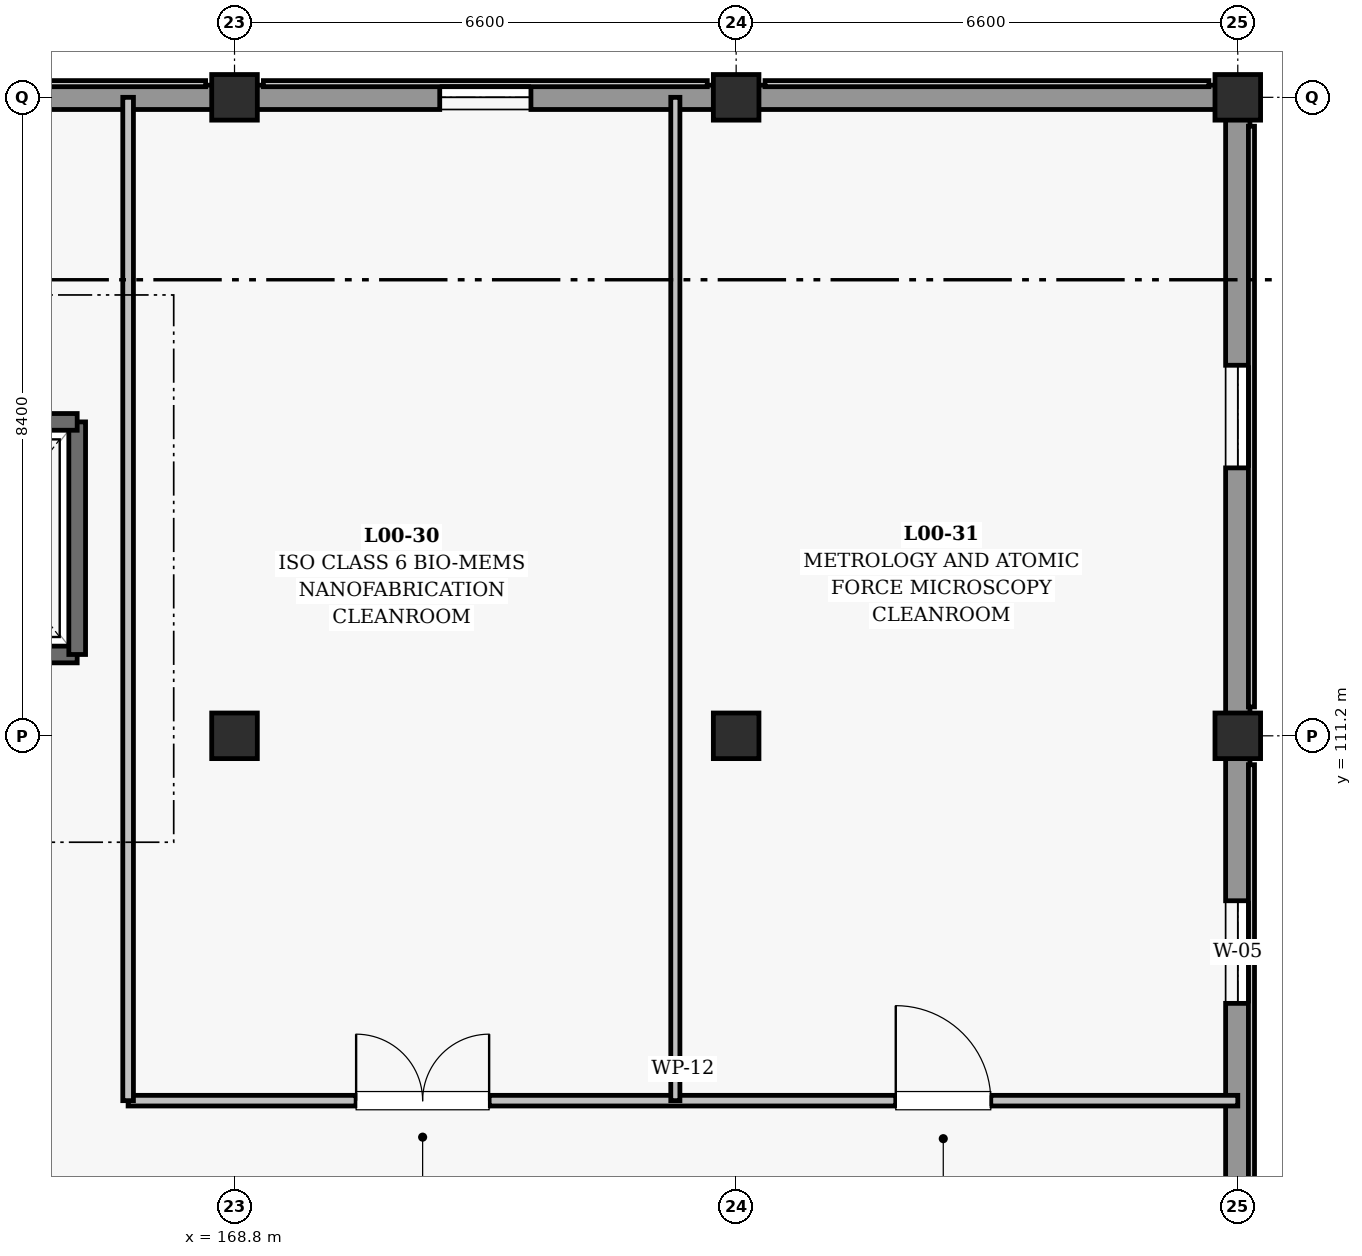
"""IFC4 building model, lengths in metres.
Left out: names, types, materials, properties, quantities, classifications, styles, units other than length and angle.
Written with IfcOpenShell. Run it as: python <this file> out.ifc"""

import sys

from ifc_helpers import new_model, si_unit, direction, frame, frame_2d, origin, origin_2d, place, context, subcontext, project, spatial, rectangle, extrude, element, fill, save


model = new_model("IFC4")
c1 = context("Model", 3, precision=1e-05, world=origin(), true_north=direction((0.0, 1.0)))
c2 = subcontext(c1, "Body", "Model", "MODEL_VIEW")
j1 = project(units=[si_unit("LENGTHUNIT", "METRE"), si_unit("PLANEANGLEUNIT", "RADIAN")], contexts=[c1])
p1 = place(None, origin())
s1 = spatial("IfcSite", under=j1, at=p1, CompositionType="ELEMENT")
p2 = place(p1, origin())
s2 = spatial("IfcBuilding", under=s1, at=p2, CompositionType="ELEMENT")
p3 = place(p2, origin())
s3 = spatial("IfcBuildingStorey", under=s2, at=p3, CompositionType="ELEMENT", Elevation=0.0)
for number, where, z_axis, x_axis in (
    (1, (168.8, 111.2, 0.0), (0.0, 0.0, 1.0), (1.0, 0.0, 0.0)),
    (2, (168.8, 119.6, 0.0), (0.0, 0.0, 1.0), (1.0, 0.0, 0.0)),
    (3, (175.4, 111.2, 0.0), (0.0, 0.0, 1.0), (1.0, 0.0, 0.0)),
    (4, (175.4, 119.6, 0.0), (0.0, 0.0, 1.0), (1.0, 0.0, 0.0)),
    (5, (182.0, 111.2, 0.0), (0.0, 0.0, 1.0), (1.0, 0.0, 0.0)),
    (6, (182.0, 119.6, 0.0), (0.0, 0.0, 1.0), (1.0, 0.0, 0.0)),
):
    element("IfcColumn", number, at=place(p3, frame(where, z_axis=z_axis, x_axis=x_axis)), inside=s3, PredefinedType="COLUMN", context=c2, shape_type="SweptSolid", body=[
        extrude(rectangle(XDim=0.6, YDim=0.6, at=origin_2d()), origin(), (0.0, 0.0, 1.0), 5.4),
    ])
p4 = place(p3, frame((162.48, 119.6, 0.0), z_axis=(0.0, 0.0, 1.0), x_axis=(1.0, 0.0, 0.0)))
e7 = element("IfcWall", 7, at=p4, inside=s3, PredefinedType="SOLIDWALL", context=c2, shape_type="SweptSolid", body=[
    extrude(rectangle(XDim=6.04, YDim=0.32, at=frame_2d((3.02, 0.0))), origin(), (0.0, 0.0, 1.0), 4.165),
])
p5 = place(p3, frame((169.08, 119.6, 0.0), z_axis=(0.0, 0.0, 1.0), x_axis=(1.0, 0.0, 0.0)))
e8 = element("IfcWall", 8, at=p5, inside=s3, PredefinedType="SOLIDWALL", context=c2, shape_type="SweptSolid", body=[
    extrude(rectangle(XDim=6.04, YDim=0.32, at=frame_2d((3.02, 0.0))), origin(), (0.0, 0.0, 1.0), 4.215),
])
p6 = place(p5, frame((2.42, 0.0, 1.85)))
e9 = element("IfcOpeningElement", 9, at=p6, cuts=e8, PredefinedType="OPENING", context=c2, shape_type="SweptSolid", body=[
    extrude(rectangle(XDim=1.2, YDim=1.1, at=frame_2d((0.6, 0.55))), frame((0.0, 0.17, 0.0), z_axis=(0.0, -1.0, 0.0), x_axis=(1.0, 0.0, 0.0)), (0.0, 0.0, 1.0), 0.34),
])
p7 = place(p3, frame((175.68, 119.6, 0.0), z_axis=(0.0, 0.0, 1.0), x_axis=(1.0, 0.0, 0.0)))
e10 = element("IfcWall", 10, at=p7, inside=s3, PredefinedType="SOLIDWALL", context=c2, shape_type="SweptSolid", body=[
    extrude(rectangle(XDim=6.04, YDim=0.32, at=frame_2d((3.02, 0.0))), origin(), (0.0, 0.0, 1.0), 4.48),
])
p8 = place(p3, frame((182.0, 103.08, 0.0), z_axis=(0.0, 0.0, 1.0), x_axis=(0.0, 1.0, 0.0)))
e11 = element("IfcWall", 11, at=p8, inside=s3, PredefinedType="SOLIDWALL", context=c2, shape_type="SweptSolid", body=[
    extrude(rectangle(XDim=7.84, YDim=0.32, at=frame_2d((3.92, 0.0))), origin(), (0.0, 0.0, 1.0), 4.315),
])
p9 = place(p8, frame((4.6, 0.0, 0.95)))
e12 = element("IfcOpeningElement", 12, at=p9, cuts=e11, PredefinedType="OPENING", context=c2, shape_type="SweptSolid", body=[
    extrude(rectangle(XDim=1.35, YDim=2.4, at=frame_2d((0.675, 1.2))), frame((0.0, 0.17, 0.0), z_axis=(0.0, -1.0, 0.0), x_axis=(1.0, 0.0, 0.0)), (0.0, 0.0, 1.0), 0.34),
])
p10 = place(p3, frame((182.0, 111.48, 0.0), z_axis=(0.0, 0.0, 1.0), x_axis=(0.0, 1.0, 0.0)))
e13 = element("IfcWall", 13, at=p10, inside=s3, PredefinedType="SOLIDWALL", context=c2, shape_type="SweptSolid", body=[
    extrude(rectangle(XDim=7.84, YDim=0.32, at=frame_2d((3.92, 0.0))), origin(), (0.0, 0.0, 1.0), 4.48),
])
p11 = place(p10, frame((3.245, 0.0, 0.95)))
e14 = element("IfcOpeningElement", 14, at=p11, cuts=e13, PredefinedType="OPENING", context=c2, shape_type="SweptSolid", body=[
    extrude(rectangle(XDim=1.35, YDim=2.4, at=frame_2d((0.675, 1.2))), frame((0.0, 0.17, 0.0), z_axis=(0.0, -1.0, 0.0), x_axis=(1.0, 0.0, 0.0)), (0.0, 0.0, 1.0), 0.34),
])
p12 = place(p3, frame((164.27, 112.27, 0.0), z_axis=(0.0, 0.0, 1.0), x_axis=(1.0, 0.0, 0.0)))
e15 = element("IfcWall", 15, at=p12, inside=s3, PredefinedType="SHEAR", context=c2, shape_type="SweptSolid", body=[
    extrude(rectangle(XDim=2.46, YDim=0.22, at=frame_2d((1.23, 0.0))), origin(), (0.0, 0.0, 1.0), 5.035),
])
p13 = place(p12, frame((0.58, 0.0, 0.0)))
e16 = element("IfcOpeningElement", 16, at=p13, cuts=e15, PredefinedType="OPENING", context=c2, shape_type="SweptSolid", body=[
    extrude(rectangle(XDim=1.3, YDim=2.2, at=frame_2d((0.65, 1.1))), frame((0.0, 0.12, 0.0), z_axis=(0.0, -1.0, 0.0), x_axis=(1.0, 0.0, 0.0)), (0.0, 0.0, 1.0), 0.24),
])
p14 = place(p3, frame((166.73, 112.27, 0.0), z_axis=(0.0, 0.0, 1.0), x_axis=(0.0, 1.0, 0.0)))
e17 = element("IfcWall", 17, at=p14, inside=s3, PredefinedType="SHEAR", context=c2, shape_type="SweptSolid", body=[
    extrude(rectangle(XDim=3.06, YDim=0.22, at=frame_2d((1.53, 0.0))), origin(), (0.0, 0.0, 1.0), 5.035),
])
p15 = place(p3, frame((166.73, 115.33, 0.0), z_axis=(0.0, 0.0, 1.0), x_axis=(-1.0, 0.0, 0.0)))
e18 = element("IfcWall", 18, at=p15, inside=s3, PredefinedType="SHEAR", context=c2, shape_type="SweptSolid", body=[
    extrude(rectangle(XDim=2.46, YDim=0.22, at=frame_2d((1.23, 0.0))), origin(), (0.0, 0.0, 1.0), 5.035),
])
p16 = place(p3, frame((167.4, 106.4, 0.0), z_axis=(0.0, 0.0, 1.0), x_axis=(1.0, 0.0, 0.0)))
e19 = element("IfcWall", 19, at=p16, inside=s3, PredefinedType="PARTITIONING", context=c2, shape_type="SweptSolid", body=[
    extrude(rectangle(XDim=14.6, YDim=0.14, at=frame_2d((7.3, 0.0))), origin(), (0.0, 0.0, 1.0), 3.82),
])
p17 = place(p16, frame((3.0, 0.0, 0.0)))
e20 = element("IfcOpeningElement", 20, at=p17, cuts=e19, PredefinedType="OPENING", context=c2, shape_type="SweptSolid", body=[
    extrude(rectangle(XDim=1.75, YDim=2.25, at=frame_2d((0.875, 1.125))), frame((0.0, 0.08, 0.0), z_axis=(0.0, -1.0, 0.0), x_axis=(1.0, 0.0, 0.0)), (0.0, 0.0, 1.0), 0.16),
])
p18 = place(p16, frame((10.1, 0.0, 0.0)))
e21 = element("IfcOpeningElement", 21, at=p18, cuts=e19, PredefinedType="OPENING", context=c2, shape_type="SweptSolid", body=[
    extrude(rectangle(XDim=1.25, YDim=2.2, at=frame_2d((0.625, 1.1))), frame((0.0, 0.08, 0.0), z_axis=(0.0, -1.0, 0.0), x_axis=(1.0, 0.0, 0.0)), (0.0, 0.0, 1.0), 0.16),
])
p19 = place(p3, frame((167.4, 106.4, 0.0), z_axis=(0.0, 0.0, 1.0), x_axis=(0.0, 1.0, 0.0)))
e22 = element("IfcWall", 22, at=p19, inside=s3, PredefinedType="PARTITIONING", context=c2, shape_type="SweptSolid", body=[
    extrude(rectangle(XDim=13.2, YDim=0.14, at=frame_2d((6.6, 0.0))), origin(), (0.0, 0.0, 1.0), 4.42),
])
p20 = place(p3, frame((174.6, 106.4, 0.0), z_axis=(0.0, 0.0, 1.0), x_axis=(0.0, 1.0, 0.0)))
e23 = element("IfcWall", 23, at=p20, inside=s3, PredefinedType="PARTITIONING", context=c2, shape_type="SweptSolid", body=[
    extrude(rectangle(XDim=13.2, YDim=0.12, at=frame_2d((6.6, 0.0))), origin(), (0.0, 0.0, 1.0), 4.47),
])
p21 = place(p6, origin())
e24 = element("IfcWindow", 24, at=p21, inside=s3, PartitioningType="SINGLE_PANEL", PredefinedType="WINDOW", context=c2, shape_type="SweptSolid", body=[
    extrude(rectangle(XDim=1.2, YDim=1.1, at=frame_2d((0.6, 0.55))), frame((0.0, 0.03, 0.0), z_axis=(0.0, -1.0, 0.0), x_axis=(1.0, 0.0, 0.0)), (0.0, 0.0, 1.0), 0.06),
])
fill(e9, e24)
p22 = place(p9, origin())
e25 = element("IfcWindow", 25, at=p22, inside=s3, PartitioningType="SINGLE_PANEL", PredefinedType="WINDOW", context=c2, shape_type="SweptSolid", body=[
    extrude(rectangle(XDim=1.35, YDim=2.4, at=frame_2d((0.675, 1.2))), frame((0.0, 0.03, 0.0), z_axis=(0.0, -1.0, 0.0), x_axis=(1.0, 0.0, 0.0)), (0.0, 0.0, 1.0), 0.06),
])
fill(e12, e25)
p23 = place(p11, origin())
e26 = element("IfcWindow", 26, at=p23, inside=s3, PartitioningType="SINGLE_PANEL", PredefinedType="WINDOW", context=c2, shape_type="SweptSolid", body=[
    extrude(rectangle(XDim=1.35, YDim=2.4, at=frame_2d((0.675, 1.2))), frame((0.0, 0.03, 0.0), z_axis=(0.0, -1.0, 0.0), x_axis=(1.0, 0.0, 0.0)), (0.0, 0.0, 1.0), 0.06),
])
fill(e14, e26)
p24 = place(p17, origin())
e27 = element("IfcDoor", 27, at=p24, inside=s3, OperationType="DOUBLE_DOOR_SINGLE_SWING", PredefinedType="DOOR", context=c2, shape_type="SweptSolid", body=[
    extrude(rectangle(XDim=1.75, YDim=2.25, at=frame_2d((0.875, 1.125))), frame((0.0, 0.025, 0.0), z_axis=(0.0, -1.0, 0.0), x_axis=(1.0, 0.0, 0.0)), (0.0, 0.0, 1.0), 0.05),
])
fill(e20, e27)
p25 = place(p18, origin())
e28 = element("IfcDoor", 28, at=p25, inside=s3, OperationType="SINGLE_SWING_LEFT", PredefinedType="DOOR", context=c2, shape_type="SweptSolid", body=[
    extrude(rectangle(XDim=1.25, YDim=2.2, at=frame_2d((0.625, 1.1))), frame((0.0, 0.025, 0.0), z_axis=(0.0, -1.0, 0.0), x_axis=(1.0, 0.0, 0.0)), (0.0, 0.0, 1.0), 0.05),
])
fill(e21, e28)
save(model, sys.argv[1])
